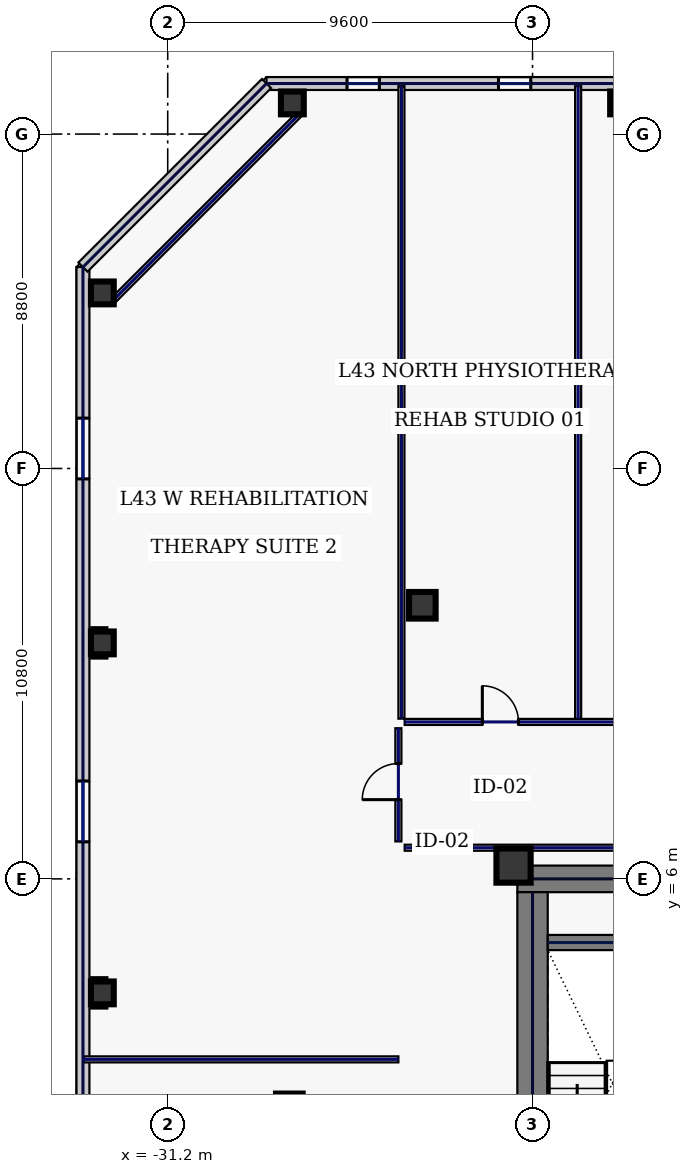
"""IFC4 building model, lengths in metres.
Left out: names, types, materials, properties, quantities, classifications, styles, units other than length and angle.
Written with IfcOpenShell. Run it as: python <this file> out.ifc"""

import sys

from ifc_helpers import new_model, si_unit, direction, frame, frame_2d, origin, origin_2d, place, context, subcontext, project, spatial, rectangle, hollow_rectangle, extrude, element, fill, save


model = new_model("IFC4")
c1 = context("Model", 3, precision=1e-05, world=origin(), true_north=direction((0.0, 1.0)))
c2 = subcontext(c1, "Body", "Model", "MODEL_VIEW")
j1 = project(units=[si_unit("LENGTHUNIT", "METRE"), si_unit("PLANEANGLEUNIT", "RADIAN")], contexts=[c1])
p1 = place(None, origin())
s1 = spatial("IfcSite", under=j1, at=p1, CompositionType="ELEMENT")
p2 = place(p1, origin())
s2 = spatial("IfcBuilding", under=s1, at=p2, CompositionType="ELEMENT")
p3 = place(p2, frame((0.0, 0.0, 188.2)))
s3 = spatial("IfcBuildingStorey", under=s2, at=p3, CompositionType="ELEMENT", Elevation=188.2)
p4 = place(p3, frame((-22.0, 6.0, 0.0), z_axis=(0.0, 0.0, 1.0), x_axis=(1.0, 0.0, 0.0)))
e1 = element("IfcWall", 1, at=p4, inside=s3, PredefinedType="SHEAR", context=c2, shape_type="SweptSolid", body=[
    extrude(rectangle(XDim=11.55, YDim=0.7, at=frame_2d((5.775, 0.0))), origin(), (0.0, 0.0, 1.0), 3.74),
])
p5 = place(p3, frame((-21.6, -5.65, 0.0), z_axis=(0.0, 0.0, 1.0), x_axis=(0.0, 1.0, 0.0)))
e2 = element("IfcWall", 2, at=p5, inside=s3, PredefinedType="SHEAR", context=c2, shape_type="SweptSolid", body=[
    extrude(rectangle(XDim=11.3, YDim=0.8, at=frame_2d((5.65, 0.0))), origin(), (0.0, 0.0, 1.0), 3.74),
])
p6 = place(p3, frame((-21.2, 4.325, 0.0), z_axis=(0.0, 0.0, 1.0), x_axis=(1.0, 0.0, 0.0)))
e3 = element("IfcWall", 3, at=p6, inside=s3, PredefinedType="SHEAR", context=c2, shape_type="SweptSolid", body=[
    extrude(rectangle(XDim=3.4, YDim=0.4, at=frame_2d((1.7, 0.0))), origin(), (0.0, 0.0, 1.0), 3.74),
])
p7 = place(p3, frame((-22.1, 6.35, 0.0), z_axis=(0.0, 0.0, 1.0), x_axis=(1.0, 0.0, 0.0)))
e4 = element("IfcColumn", 4, at=p7, inside=s3, PredefinedType="COLUMN", context=c2, shape_type="SweptSolid", body=[
    extrude(hollow_rectangle(XDim=0.9, YDim=0.9, WallThickness=0.04, at=origin_2d()), origin(), (0.0, 0.0, 1.0), 3.74),
])
for number, where, z_axis, x_axis in (
    (5, (-24.5, 13.2, 0.0), (0.0, 0.0, 1.0), (1.0, 0.0, 0.0)),
    (6, (-28.0, 0.0, 0.0), (0.0, 0.0, 1.0), (1.0, 0.0, 0.0)),
):
    element("IfcColumn", number, at=place(p3, frame(where, z_axis=z_axis, x_axis=x_axis)), inside=s3, PredefinedType="COLUMN", context=c2, shape_type="SweptSolid", body=[
        extrude(hollow_rectangle(XDim=0.7, YDim=0.7, WallThickness=0.032, at=origin_2d()), origin(), (0.0, 0.0, 1.0), 3.74),
    ])
for number, where, z_axis, x_axis in (
    (7, (-19.257, 26.42, 0.0), (0.0, 0.0, 1.0), (1.0, 0.0, 0.0)),
    (8, (-27.92, 26.42, 0.0), (0.0, 0.0, 1.0), (1.0, 0.0, 0.0)),
    (9, (-32.92, 21.42, 0.0), (0.0, 0.0, 1.0), (1.0, 0.0, 0.0)),
    (10, (-32.92, 12.21, 0.0), (0.0, 0.0, 1.0), (1.0, 0.0, 0.0)),
    (11, (-32.92, 3.0, 0.0), (0.0, 0.0, 1.0), (1.0, 0.0, 0.0)),
):
    element("IfcColumn", number, at=place(p3, frame(where, z_axis=z_axis, x_axis=x_axis)), inside=s3, PredefinedType="COLUMN", context=c2, shape_type="SweptSolid", body=[
        extrude(hollow_rectangle(XDim=0.6, YDim=0.6, WallThickness=0.028, at=origin_2d()), origin(), (0.0, 0.0, 1.0), 3.74),
    ])
p8 = place(p3, frame((-8.663, 26.93, 0.0), z_axis=(0.0, 0.0, 1.0), x_axis=(-1.0, 0.0, 0.0)))
e12 = element("IfcWall", 12, at=p8, inside=s3, PredefinedType="STANDARD", context=c2, shape_type="SweptSolid", body=[
    extrude(rectangle(XDim=19.937, YDim=0.34, at=frame_2d((9.969, 0.0))), origin(), (0.0, 0.0, 1.0), 3.74),
])
p9 = place(p8, frame((16.968, 0.0, 0.7)))
e13 = element("IfcOpeningElement", 13, at=p9, cuts=e12, PredefinedType="OPENING", context=c2, shape_type="SweptSolid", body=[
    extrude(rectangle(XDim=0.85, YDim=1.85, at=frame_2d((0.425, 0.925))), frame((0.0, 0.18, 0.0), z_axis=(0.0, -1.0, 0.0), x_axis=(1.0, 0.0, 0.0)), (0.0, 0.0, 1.0), 0.36),
])
p10 = place(p8, frame((12.983, 0.0, 0.7)))
e14 = element("IfcOpeningElement", 14, at=p10, cuts=e12, PredefinedType="OPENING", context=c2, shape_type="SweptSolid", body=[
    extrude(rectangle(XDim=0.85, YDim=1.85, at=frame_2d((0.425, 0.925))), frame((0.0, 0.18, 0.0), z_axis=(0.0, -1.0, 0.0), x_axis=(1.0, 0.0, 0.0)), (0.0, 0.0, 1.0), 0.36),
])
p11 = place(p8, frame((7.355, 0.0, 0.7)))
e15 = element("IfcOpeningElement", 15, at=p11, cuts=e12, PredefinedType="OPENING", context=c2, shape_type="SweptSolid", body=[
    extrude(rectangle(XDim=1.8, YDim=2.2, at=frame_2d((0.9, 1.1))), frame((0.0, 0.18, 0.0), z_axis=(0.0, -1.0, 0.0), x_axis=(1.0, 0.0, 0.0)), (0.0, 0.0, 1.0), 0.36),
])
p12 = place(p3, frame((-33.43, 22.1, 0.0), z_axis=(0.0, 0.0, 1.0), x_axis=(0.0, -1.0, 0.0)))
e16 = element("IfcWall", 16, at=p12, inside=s3, PredefinedType="STANDARD", context=c2, shape_type="SweptSolid", body=[
    extrude(rectangle(XDim=38.2, YDim=0.34, at=frame_2d((19.1, 0.0))), origin(), (0.0, 0.0, 1.0), 3.74),
])
p13 = place(p12, frame((3.975, 0.0, 0.58)))
e17 = element("IfcOpeningElement", 17, at=p13, cuts=e16, PredefinedType="OPENING", context=c2, shape_type="SweptSolid", body=[
    extrude(rectangle(XDim=1.6, YDim=2.3, at=frame_2d((0.8, 1.15))), frame((0.0, 0.18, 0.0), z_axis=(0.0, -1.0, 0.0), x_axis=(1.0, 0.0, 0.0)), (0.0, 0.0, 1.0), 0.36),
])
p14 = place(p12, frame((13.525, 0.0, 0.58)))
e18 = element("IfcOpeningElement", 18, at=p14, cuts=e16, PredefinedType="OPENING", context=c2, shape_type="SweptSolid", body=[
    extrude(rectangle(XDim=1.6, YDim=2.3, at=frame_2d((0.8, 1.15))), frame((0.0, 0.18, 0.0), z_axis=(0.0, -1.0, 0.0), x_axis=(1.0, 0.0, 0.0)), (0.0, 0.0, 1.0), 0.36),
])
p15 = place(p12, frame((23.075, 0.0, 0.58)))
e19 = element("IfcOpeningElement", 19, at=p15, cuts=e16, PredefinedType="OPENING", context=c2, shape_type="SweptSolid", body=[
    extrude(rectangle(XDim=1.6, YDim=2.3, at=frame_2d((0.8, 1.15))), frame((0.0, 0.18, 0.0), z_axis=(0.0, -1.0, 0.0), x_axis=(1.0, 0.0, 0.0)), (0.0, 0.0, 1.0), 0.36),
])
p16 = place(p12, frame((32.625, 0.0, 0.58)))
e20 = element("IfcOpeningElement", 20, at=p16, cuts=e16, PredefinedType="OPENING", context=c2, shape_type="SweptSolid", body=[
    extrude(rectangle(XDim=1.6, YDim=2.3, at=frame_2d((0.8, 1.15))), frame((0.0, 0.18, 0.0), z_axis=(0.0, -1.0, 0.0), x_axis=(1.0, 0.0, 0.0)), (0.0, 0.0, 1.0), 0.36),
])
p17 = place(p3, frame((-28.6, 26.93, 0.0), z_axis=(0.0, 0.0, 1.0), x_axis=(-0.707106781187, -0.707106781187, 0.0)))
e21 = element("IfcWall", 21, at=p17, inside=s3, PredefinedType="STANDARD", context=c2, shape_type="SweptSolid", body=[
    extrude(rectangle(XDim=6.83, YDim=0.34, at=frame_2d((3.415, 0.0))), origin(), (0.0, 0.0, 1.0), 3.74),
])
p18 = place(p3, frame((-27.68, 26.18, 0.0), z_axis=(0.0, 0.0, 1.0), x_axis=(-0.707106781187, -0.707106781187, 0.0)))
e22 = element("IfcWall", 22, at=p18, inside=s3, PredefinedType="PARTITIONING", context=c2, shape_type="SweptSolid", body=[
    extrude(rectangle(XDim=7.071, YDim=0.16, at=frame_2d((3.536, 0.0))), origin(), (0.0, 0.0, 1.0), 3.74),
])
p19 = place(p3, frame((-10.63, 6.82, 0.0), z_axis=(0.0, 0.0, 1.0), x_axis=(-1.0, 0.0, 0.0)))
e23 = element("IfcWall", 23, at=p19, inside=s3, PredefinedType="PARTITIONING", context=c2, shape_type="SweptSolid", body=[
    extrude(rectangle(XDim=14.335, YDim=0.16, at=frame_2d((7.167, 0.0))), origin(), (0.0, 0.0, 1.0), 3.74),
])
p20 = place(p3, frame((-25.13, 6.985, 0.0), z_axis=(0.0, 0.0, 1.0), x_axis=(0.0, 1.0, 0.0)))
e24 = element("IfcWall", 24, at=p20, inside=s3, PredefinedType="PARTITIONING", context=c2, shape_type="SweptSolid", body=[
    extrude(rectangle(XDim=2.98, YDim=0.16, at=frame_2d((1.49, 0.0))), origin(), (0.0, 0.0, 1.0), 3.74),
])
p21 = place(p20, frame((1.1, 0.0, 0.0)))
e25 = element("IfcOpeningElement", 25, at=p21, cuts=e24, PredefinedType="OPENING", context=c2, shape_type="SweptSolid", body=[
    extrude(rectangle(XDim=0.95, YDim=2.2, at=frame_2d((0.475, 1.1))), frame((0.0, 0.09, 0.0), z_axis=(0.0, -1.0, 0.0), x_axis=(1.0, 0.0, 0.0)), (0.0, 0.0, 1.0), 0.18),
])
p22 = place(p3, frame((-24.965, 10.13, 0.0), z_axis=(0.0, 0.0, 1.0), x_axis=(1.0, 0.0, 0.0)))
e26 = element("IfcWall", 26, at=p22, inside=s3, PredefinedType="PARTITIONING", context=c2, shape_type="SweptSolid", body=[
    extrude(rectangle(XDim=49.93, YDim=0.16, at=frame_2d((24.965, 0.0))), origin(), (0.0, 0.0, 1.0), 3.74),
])
p23 = place(p22, frame((2.044, 0.0, 0.0)))
e27 = element("IfcOpeningElement", 27, at=p23, cuts=e26, PredefinedType="OPENING", context=c2, shape_type="SweptSolid", body=[
    extrude(rectangle(XDim=0.95, YDim=2.2, at=frame_2d((0.475, 1.1))), frame((0.0, 0.09, 0.0), z_axis=(0.0, -1.0, 0.0), x_axis=(1.0, 0.0, 0.0)), (0.0, 0.0, 1.0), 0.18),
])
p24 = place(p22, frame((7.675, 0.0, 0.0)))
e28 = element("IfcOpeningElement", 28, at=p24, cuts=e26, PredefinedType="OPENING", context=c2, shape_type="SweptSolid", body=[
    extrude(rectangle(XDim=1.3, YDim=2.2, at=frame_2d((0.65, 1.1))), frame((0.0, 0.09, 0.0), z_axis=(0.0, -1.0, 0.0), x_axis=(1.0, 0.0, 0.0)), (0.0, 0.0, 1.0), 0.18),
])
p25 = place(p22, frame((14.75, 0.0, 0.0)))
e29 = element("IfcOpeningElement", 29, at=p25, cuts=e26, PredefinedType="OPENING", context=c2, shape_type="SweptSolid", body=[
    extrude(rectangle(XDim=1.05, YDim=2.2, at=frame_2d((0.525, 1.1))), frame((0.0, 0.09, 0.0), z_axis=(0.0, -1.0, 0.0), x_axis=(1.0, 0.0, 0.0)), (0.0, 0.0, 1.0), 0.18),
])
p26 = place(p22, frame((20.9, 0.0, 0.0)))
e30 = element("IfcOpeningElement", 30, at=p26, cuts=e26, PredefinedType="OPENING", context=c2, shape_type="SweptSolid", body=[
    extrude(rectangle(XDim=0.95, YDim=2.2, at=frame_2d((0.475, 1.1))), frame((0.0, 0.09, 0.0), z_axis=(0.0, -1.0, 0.0), x_axis=(1.0, 0.0, 0.0)), (0.0, 0.0, 1.0), 0.18),
])
p27 = place(p22, frame((26.3, 0.0, 0.0)))
e31 = element("IfcOpeningElement", 31, at=p27, cuts=e26, PredefinedType="OPENING", context=c2, shape_type="SweptSolid", body=[
    extrude(rectangle(XDim=0.95, YDim=2.2, at=frame_2d((0.475, 1.1))), frame((0.0, 0.09, 0.0), z_axis=(0.0, -1.0, 0.0), x_axis=(1.0, 0.0, 0.0)), (0.0, 0.0, 1.0), 0.18),
])
p28 = place(p22, frame((31.73, 0.0, 0.0)))
e32 = element("IfcOpeningElement", 32, at=p28, cuts=e26, PredefinedType="OPENING", context=c2, shape_type="SweptSolid", body=[
    extrude(rectangle(XDim=1.15, YDim=2.2, at=frame_2d((0.575, 1.1))), frame((0.0, 0.09, 0.0), z_axis=(0.0, -1.0, 0.0), x_axis=(1.0, 0.0, 0.0)), (0.0, 0.0, 1.0), 0.18),
])
p29 = place(p22, frame((37.19, 0.0, 0.0)))
e33 = element("IfcOpeningElement", 33, at=p29, cuts=e26, PredefinedType="OPENING", context=c2, shape_type="SweptSolid", body=[
    extrude(rectangle(XDim=0.95, YDim=2.2, at=frame_2d((0.475, 1.1))), frame((0.0, 0.09, 0.0), z_axis=(0.0, -1.0, 0.0), x_axis=(1.0, 0.0, 0.0)), (0.0, 0.0, 1.0), 0.18),
])
p30 = place(p22, frame((42.16, 0.0, 0.0)))
e34 = element("IfcOpeningElement", 34, at=p30, cuts=e26, PredefinedType="OPENING", context=c2, shape_type="SweptSolid", body=[
    extrude(rectangle(XDim=1.3, YDim=2.2, at=frame_2d((0.65, 1.1))), frame((0.0, 0.09, 0.0), z_axis=(0.0, -1.0, 0.0), x_axis=(1.0, 0.0, 0.0)), (0.0, 0.0, 1.0), 0.18),
])
p31 = place(p22, frame((46.931, 0.0, 0.0)))
e35 = element("IfcOpeningElement", 35, at=p31, cuts=e26, PredefinedType="OPENING", context=c2, shape_type="SweptSolid", body=[
    extrude(rectangle(XDim=1.45, YDim=2.2, at=frame_2d((0.725, 1.1))), frame((0.0, 0.09, 0.0), z_axis=(0.0, -1.0, 0.0), x_axis=(1.0, 0.0, 0.0)), (0.0, 0.0, 1.0), 0.18),
])
p32 = place(p3, frame((-25.05, 10.215, 0.0), z_axis=(0.0, 0.0, 1.0), x_axis=(0.0, 1.0, 0.0)))
e36 = element("IfcWall", 36, at=p32, inside=s3, PredefinedType="PARTITIONING", context=c2, shape_type="SweptSolid", body=[
    extrude(rectangle(XDim=16.645, YDim=0.16, at=frame_2d((8.323, 0.0))), origin(), (0.0, 0.0, 1.0), 3.285),
])
p33 = place(p3, frame((-20.4, 10.215, 0.0), z_axis=(0.0, 0.0, 1.0), x_axis=(0.0, 1.0, 0.0)))
e37 = element("IfcWall", 37, at=p33, inside=s3, PredefinedType="PARTITIONING", context=c2, shape_type="SweptSolid", body=[
    extrude(rectangle(XDim=16.645, YDim=0.16, at=frame_2d((8.323, 0.0))), origin(), (0.0, 0.0, 1.0), 3.74),
])
p34 = place(p3, frame((-33.41, 1.25, 0.0), z_axis=(0.0, 0.0, 1.0), x_axis=(1.0, 0.0, 0.0)))
e38 = element("IfcWall", 38, at=p34, inside=s3, PredefinedType="PARTITIONING", context=c2, shape_type="SweptSolid", body=[
    extrude(rectangle(XDim=8.28, YDim=0.16, at=frame_2d((4.14, 0.0))), origin(), (0.0, 0.0, 1.0), 3.74),
])
p35 = place(p9, origin())
e39 = element("IfcWindow", 39, at=p35, inside=s3, PartitioningType="SINGLE_PANEL", PredefinedType="WINDOW", context=c2, shape_type="SweptSolid", body=[
    extrude(rectangle(XDim=0.85, YDim=1.85, at=frame_2d((0.425, 0.925))), frame((0.0, 0.03, 0.0), z_axis=(0.0, -1.0, 0.0), x_axis=(1.0, 0.0, 0.0)), (0.0, 0.0, 1.0), 0.06),
])
fill(e13, e39)
p36 = place(p10, origin())
e40 = element("IfcWindow", 40, at=p36, inside=s3, PartitioningType="SINGLE_PANEL", PredefinedType="WINDOW", context=c2, shape_type="SweptSolid", body=[
    extrude(rectangle(XDim=0.85, YDim=1.85, at=frame_2d((0.425, 0.925))), frame((0.0, 0.03, 0.0), z_axis=(0.0, -1.0, 0.0), x_axis=(1.0, 0.0, 0.0)), (0.0, 0.0, 1.0), 0.06),
])
fill(e14, e40)
p37 = place(p13, origin())
e41 = element("IfcWindow", 41, at=p37, inside=s3, PartitioningType="SINGLE_PANEL", PredefinedType="WINDOW", context=c2, shape_type="SweptSolid", body=[
    extrude(rectangle(XDim=1.6, YDim=2.3, at=frame_2d((0.8, 1.15))), frame((0.0, 0.03, 0.0), z_axis=(0.0, -1.0, 0.0), x_axis=(1.0, 0.0, 0.0)), (0.0, 0.0, 1.0), 0.06),
])
fill(e17, e41)
p38 = place(p14, origin())
e42 = element("IfcWindow", 42, at=p38, inside=s3, PartitioningType="SINGLE_PANEL", PredefinedType="WINDOW", context=c2, shape_type="SweptSolid", body=[
    extrude(rectangle(XDim=1.6, YDim=2.3, at=frame_2d((0.8, 1.15))), frame((0.0, 0.03, 0.0), z_axis=(0.0, -1.0, 0.0), x_axis=(1.0, 0.0, 0.0)), (0.0, 0.0, 1.0), 0.06),
])
fill(e18, e42)
p39 = place(p23, origin())
e43 = element("IfcDoor", 43, at=p39, inside=s3, OperationType="SINGLE_SWING_LEFT", PredefinedType="DOOR", context=c2, shape_type="SweptSolid", body=[
    extrude(rectangle(XDim=0.95, YDim=2.2, at=frame_2d((0.475, 1.1))), frame((0.0, 0.025, 0.0), z_axis=(0.0, -1.0, 0.0), x_axis=(1.0, 0.0, 0.0)), (0.0, 0.0, 1.0), 0.05),
])
fill(e27, e43)
p40 = place(p21, origin())
e44 = element("IfcDoor", 44, at=p40, inside=s3, OperationType="SINGLE_SWING_LEFT", PredefinedType="DOOR", context=c2, shape_type="SweptSolid", body=[
    extrude(rectangle(XDim=0.95, YDim=2.2, at=frame_2d((0.475, 1.1))), frame((0.0, 0.025, 0.0), z_axis=(0.0, -1.0, 0.0), x_axis=(1.0, 0.0, 0.0)), (0.0, 0.0, 1.0), 0.05),
])
fill(e25, e44)
save(model, sys.argv[1])
